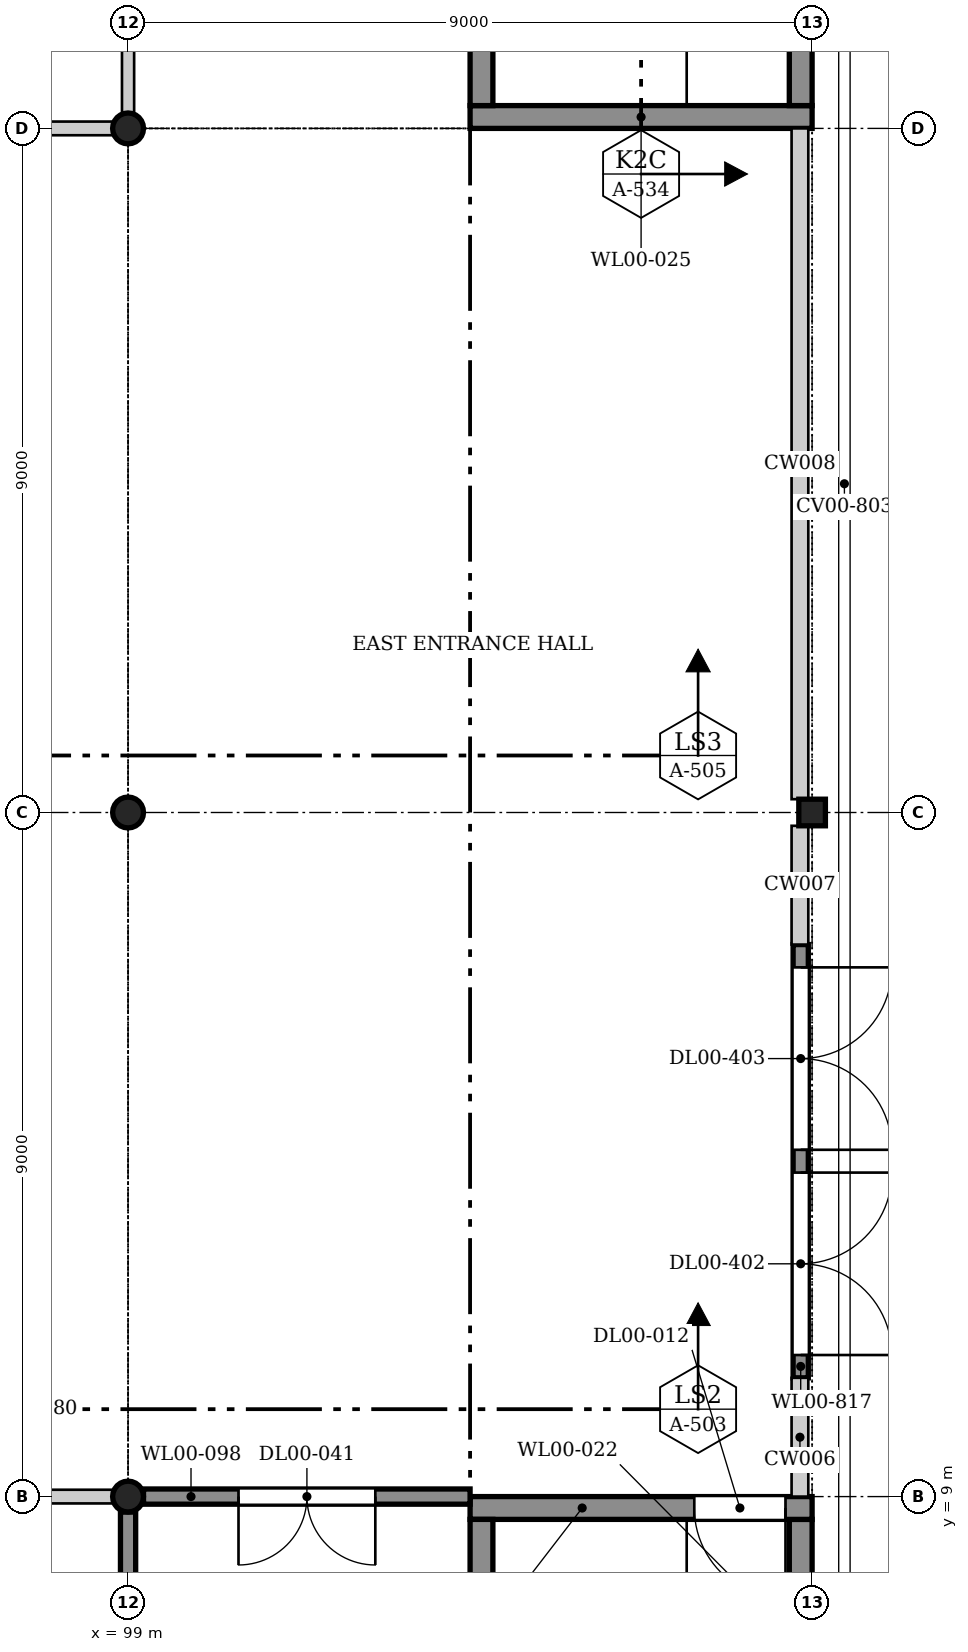
"""IFC4 building model, lengths in metres.
Left out: names, types, materials, properties, quantities, classifications, styles, units other than length and angle.
Written with IfcOpenShell. Run it as: python <this file> out.ifc"""

import sys

from ifc_helpers import new_model, si_unit, direction, frame, frame_2d, origin, origin_2d, place, context, subcontext, project, spatial, rectangle, hollow_rectangle, hollow_circle, extrude, element, fill, save


model = new_model("IFC4")
c1 = context("Model", 3, precision=1e-05, world=origin(), true_north=direction((0.0, 1.0)))
c2 = subcontext(c1, "Body", "Model", "MODEL_VIEW")
j1 = project(units=[si_unit("LENGTHUNIT", "METRE"), si_unit("PLANEANGLEUNIT", "RADIAN")], contexts=[c1])
p1 = place(None, origin())
s1 = spatial("IfcSite", under=j1, at=p1, CompositionType="ELEMENT")
p2 = place(p1, origin())
s2 = spatial("IfcBuilding", under=s1, at=p2, CompositionType="ELEMENT")
p3 = place(p2, origin())
s3 = spatial("IfcBuildingStorey", under=s2, at=p3, CompositionType="ELEMENT", Elevation=0.0)
for number, where, z_axis, x_axis in (
    (1, (99.0, 9.0, 0.0), (0.0, 0.0, 1.0), (1.0, 0.0, 0.0)),
    (2, (99.0, 18.0, 0.0), (0.0, 0.0, 1.0), (1.0, 0.0, 0.0)),
):
    element("IfcColumn", number, at=place(p3, frame(where, z_axis=z_axis, x_axis=x_axis)), inside=s3, PredefinedType="COLUMN", context=c2, shape_type="SweptSolid", body=[
        extrude(hollow_circle(Radius=0.203, WallThickness=0.013, at=origin_2d()), origin(), (0.0, 0.0, 1.0), 5.0),
    ])
p4 = place(p3, frame((108.0, 18.0, 0.0), z_axis=(0.0, 0.0, 1.0), x_axis=(1.0, 0.0, 0.0)))
e3 = element("IfcColumn", 3, at=p4, inside=s3, PredefinedType="COLUMN", context=c2, shape_type="SweptSolid", body=[
    extrude(hollow_rectangle(XDim=0.35, YDim=0.35, WallThickness=0.016, InnerFilletRadius=0.024, OuterFilletRadius=0.04, at=origin_2d()), origin(), (0.0, 0.0, 1.0), 5.0),
])
p5 = place(p3, frame((99.0, 27.0, 0.0), z_axis=(0.0, 0.0, 1.0), x_axis=(1.0, 0.0, 0.0)))
e4 = element("IfcColumn", 4, at=p5, inside=s3, PredefinedType="COLUMN", context=c2, shape_type="SweptSolid", body=[
    extrude(hollow_circle(Radius=0.203, WallThickness=0.013, at=origin_2d()), origin(), (0.0, 0.0, 1.0), 5.0),
])
p6 = place(p3, frame((107.85, 10.562, 0.0), z_axis=(0.0, 0.0, 1.0), x_axis=(0.0, 1.0, 0.0)))
e5 = element("IfcWall", 5, at=p6, inside=s3, PredefinedType="SOLIDWALL", context=c2, shape_type="SweptSolid", body=[
    extrude(rectangle(XDim=5.7, YDim=0.2, at=frame_2d((2.85, 0.0))), origin(), (0.0, 0.0, 1.0), 4.835),
])
p7 = place(p6, frame((0.3, 0.0, 0.0)))
e6 = element("IfcOpeningElement", 6, at=p7, cuts=e5, PredefinedType="OPENING", context=c2, shape_type="SweptSolid", body=[
    extrude(rectangle(XDim=2.4, YDim=2.4, at=frame_2d((1.2, 1.2))), frame((0.0, 0.11, 0.0), z_axis=(0.0, -1.0, 0.0), x_axis=(1.0, 0.0, 0.0)), (0.0, 0.0, 1.0), 0.22),
])
p8 = place(p6, frame((3.0, 0.0, 0.0)))
e7 = element("IfcOpeningElement", 7, at=p8, cuts=e5, PredefinedType="OPENING", context=c2, shape_type="SweptSolid", body=[
    extrude(rectangle(XDim=2.4, YDim=2.4, at=frame_2d((1.2, 1.2))), frame((0.0, 0.11, 0.0), z_axis=(0.0, -1.0, 0.0), x_axis=(1.0, 0.0, 0.0)), (0.0, 0.0, 1.0), 0.22),
])
p9 = place(p3, frame((107.85, 0.3, 0.0), z_axis=(0.0, 0.0, 1.0), x_axis=(0.0, 1.0, 0.0)))
e8 = element("IfcWall", 8, at=p9, inside=s3, PredefinedType="SOLIDWALL", context=c2, shape_type="SweptSolid", body=[
    extrude(rectangle(XDim=8.4, YDim=0.3, at=frame_2d((4.2, 0.0))), origin(), (0.0, 0.0, 1.0), 5.0),
])
p10 = place(p9, frame((3.25, 0.0, 0.0)))
e9 = element("IfcOpeningElement", 9, at=p10, cuts=e8, PredefinedType="OPENING", context=c2, shape_type="SweptSolid", body=[
    extrude(rectangle(XDim=1.8, YDim=2.1, at=frame_2d((0.9, 1.05))), frame((0.0, 0.16, 0.0), z_axis=(0.0, -1.0, 0.0), x_axis=(1.0, 0.0, 0.0)), (0.0, 0.0, 1.0), 0.32),
])
p11 = place(p3, frame((103.5, 8.85, 0.0), z_axis=(0.0, 0.0, 1.0), x_axis=(1.0, 0.0, 0.0)))
e10 = element("IfcWall", 10, at=p11, inside=s3, PredefinedType="SOLIDWALL", context=c2, shape_type="SweptSolid", body=[
    extrude(rectangle(XDim=4.5, YDim=0.3, at=frame_2d((2.25, 0.0))), origin(), (0.0, 0.0, 1.0), 5.0),
])
p12 = place(p11, frame((2.95, 0.0, 0.0)))
e11 = element("IfcOpeningElement", 11, at=p12, cuts=e10, PredefinedType="OPENING", context=c2, shape_type="SweptSolid", body=[
    extrude(rectangle(XDim=1.2, YDim=2.1, at=frame_2d((0.6, 1.05))), frame((0.0, 0.16, 0.0), z_axis=(0.0, -1.0, 0.0), x_axis=(1.0, 0.0, 0.0)), (0.0, 0.0, 1.0), 0.32),
])
p13 = place(p3, frame((103.65, 0.3, 0.0), z_axis=(0.0, 0.0, 1.0), x_axis=(0.0, 1.0, 0.0)))
e12 = element("IfcWall", 12, at=p13, inside=s3, PredefinedType="SOLIDWALL", context=c2, shape_type="SweptSolid", body=[
    extrude(rectangle(XDim=8.4, YDim=0.3, at=frame_2d((4.2, 0.0))), origin(), (0.0, 0.0, 1.0), 5.0),
])
p14 = place(p3, frame((103.5, 27.15, 0.0), z_axis=(0.0, 0.0, 1.0), x_axis=(1.0, 0.0, 0.0)))
e13 = element("IfcWall", 13, at=p14, inside=s3, PredefinedType="SOLIDWALL", context=c2, shape_type="SweptSolid", body=[
    extrude(rectangle(XDim=4.5, YDim=0.3, at=frame_2d((2.25, 0.0))), origin(), (0.0, 0.0, 1.0), 5.0),
])
p15 = place(p3, frame((107.85, 27.3, 0.0), z_axis=(0.0, 0.0, 1.0), x_axis=(0.0, 1.0, 0.0)))
e14 = element("IfcWall", 14, at=p15, inside=s3, PredefinedType="SOLIDWALL", context=c2, shape_type="SweptSolid", body=[
    extrude(rectangle(XDim=8.4, YDim=0.3, at=frame_2d((4.2, 0.0))), origin(), (0.0, 0.0, 1.0), 5.0),
])
p16 = place(p15, frame((3.25, 0.0, 0.0)))
e15 = element("IfcOpeningElement", 15, at=p16, cuts=e14, PredefinedType="OPENING", context=c2, shape_type="SweptSolid", body=[
    extrude(rectangle(XDim=1.8, YDim=2.1, at=frame_2d((0.9, 1.05))), frame((0.0, 0.16, 0.0), z_axis=(0.0, -1.0, 0.0), x_axis=(1.0, 0.0, 0.0)), (0.0, 0.0, 1.0), 0.32),
])
p17 = place(p3, frame((103.65, 27.3, 0.0), z_axis=(0.0, 0.0, 1.0), x_axis=(0.0, 1.0, 0.0)))
e16 = element("IfcWall", 16, at=p17, inside=s3, PredefinedType="SOLIDWALL", context=c2, shape_type="SweptSolid", body=[
    extrude(rectangle(XDim=8.4, YDim=0.3, at=frame_2d((4.2, 0.0))), origin(), (0.0, 0.0, 1.0), 5.0),
])
p18 = place(p3, frame((99.203, 9.0, 0.0), z_axis=(0.0, 0.0, 1.0), x_axis=(1.0, 0.0, 0.0)))
e17 = element("IfcWall", 17, at=p18, inside=s3, PredefinedType="PARTITIONING", context=c2, shape_type="SweptSolid", body=[
    extrude(rectangle(XDim=4.297, YDim=0.2, at=frame_2d((2.148, 0.0))), origin(), (0.0, 0.0, 1.0), 4.302),
])
p19 = place(p18, frame((1.25, 0.0, 0.0)))
e18 = element("IfcOpeningElement", 18, at=p19, cuts=e17, PredefinedType="OPENING", context=c2, shape_type="SweptSolid", body=[
    extrude(rectangle(XDim=1.8, YDim=2.1, at=frame_2d((0.9, 1.05))), frame((0.0, 0.11, 0.0), z_axis=(0.0, -1.0, 0.0), x_axis=(1.0, 0.0, 0.0)), (0.0, 0.0, 1.0), 0.22),
])
p20 = place(p3, frame((99.0, 0.175, 0.0), z_axis=(0.0, 0.0, 1.0), x_axis=(0.0, 1.0, 0.0)))
e19 = element("IfcWall", 19, at=p20, inside=s3, PredefinedType="PARTITIONING", context=c2, shape_type="SweptSolid", body=[
    extrude(rectangle(XDim=8.622, YDim=0.2, at=frame_2d((4.311, 0.0))), origin(), (0.0, 0.0, 1.0), 4.302),
])
p21 = place(p7, frame((2.4, 0.0, 0.0), z_axis=(0.0, 0.0, 1.0), x_axis=(-1.0, 0.0, 0.0)))
e20 = element("IfcDoor", 20, at=p21, inside=s3, OperationType="DOUBLE_DOOR_SINGLE_SWING", PredefinedType="DOOR", context=c2, shape_type="SweptSolid", body=[
    extrude(rectangle(XDim=2.4, YDim=2.4, at=frame_2d((1.2, 1.2))), frame((0.0, 0.025, 0.0), z_axis=(0.0, -1.0, 0.0), x_axis=(1.0, 0.0, 0.0)), (0.0, 0.0, 1.0), 0.05),
])
fill(e6, e20)
p22 = place(p8, frame((2.4, 0.0, 0.0), z_axis=(0.0, 0.0, 1.0), x_axis=(-1.0, 0.0, 0.0)))
e21 = element("IfcDoor", 21, at=p22, inside=s3, OperationType="DOUBLE_DOOR_SINGLE_SWING", PredefinedType="DOOR", context=c2, shape_type="SweptSolid", body=[
    extrude(rectangle(XDim=2.4, YDim=2.4, at=frame_2d((1.2, 1.2))), frame((0.0, 0.025, 0.0), z_axis=(0.0, -1.0, 0.0), x_axis=(1.0, 0.0, 0.0)), (0.0, 0.0, 1.0), 0.05),
])
fill(e7, e21)
p23 = place(p12, frame((1.2, 0.0, 0.0), z_axis=(0.0, 0.0, 1.0), x_axis=(-1.0, 0.0, 0.0)))
e22 = element("IfcDoor", 22, at=p23, inside=s3, OperationType="SINGLE_SWING_RIGHT", PredefinedType="DOOR", context=c2, shape_type="SweptSolid", body=[
    extrude(rectangle(XDim=1.2, YDim=2.1, at=frame_2d((0.6, 1.05))), frame((0.0, 0.025, 0.0), z_axis=(0.0, -1.0, 0.0), x_axis=(1.0, 0.0, 0.0)), (0.0, 0.0, 1.0), 0.05),
])
fill(e11, e22)
p24 = place(p19, frame((1.8, 0.0, 0.0), z_axis=(0.0, 0.0, 1.0), x_axis=(-1.0, 0.0, 0.0)))
e23 = element("IfcDoor", 23, at=p24, inside=s3, OperationType="DOUBLE_DOOR_SINGLE_SWING", PredefinedType="DOOR", context=c2, shape_type="SweptSolid", body=[
    extrude(rectangle(XDim=1.8, YDim=2.1, at=frame_2d((0.9, 1.05))), frame((0.0, 0.025, 0.0), z_axis=(0.0, -1.0, 0.0), x_axis=(1.0, 0.0, 0.0)), (0.0, 0.0, 1.0), 0.05),
])
fill(e18, e23)
save(model, sys.argv[1])
